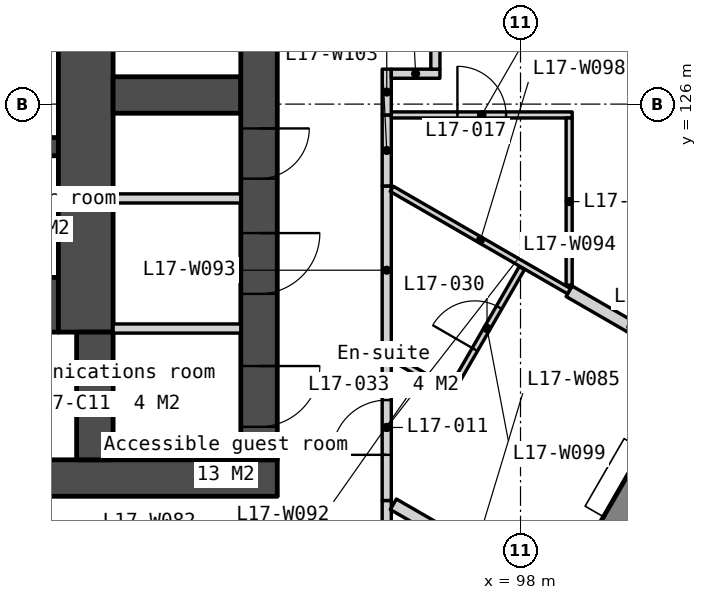
"""IFC4 building model, lengths in metres.
Left out: names, types, materials, properties, quantities, classifications, styles, units other than length and angle.
Written with IfcOpenShell. Run it as: python <this file> out.ifc"""

import sys

from ifc_helpers import new_model, si_unit, direction, frame, frame_2d, origin, place, context, subcontext, project, spatial, polyline, rectangle, outline, extrude, element, fill, save


model = new_model("IFC4")
c1 = context("Model", 3, precision=1e-05, world=origin(), true_north=direction((0.0, 1.0)))
c2 = subcontext(c1, "Body", "Model", "MODEL_VIEW")
j1 = project(units=[si_unit("LENGTHUNIT", "METRE"), si_unit("PLANEANGLEUNIT", "RADIAN")], contexts=[c1])
p1 = place(None, origin())
s1 = spatial("IfcSite", under=j1, at=p1, CompositionType="ELEMENT")
p2 = place(p1, origin())
s2 = spatial("IfcBuilding", under=s1, at=p2, CompositionType="ELEMENT")
p3 = place(p2, frame((0.0, 0.0, 73.5)))
s3 = spatial("IfcBuildingStorey", under=s2, at=p3, CompositionType="ELEMENT", Elevation=73.5)
p4 = place(p3, frame((66.0, 119.85, 0.0), z_axis=(0.0, 0.0, 1.0), x_axis=(1.0, 0.0, 0.0)))
e1 = element("IfcWall", 1, at=p4, inside=s3, PredefinedType="SOLIDWALL", context=c2, shape_type="SweptSolid", body=[
    extrude(rectangle(XDim=28.0, YDim=0.6, at=frame_2d((14.0, 0.0))), origin(), (0.0, 0.0, 1.0), 3.25),
])
p5 = place(p4, frame((6.825, 0.0, 0.0)))
e2 = element("IfcOpeningElement", 2, at=p5, cuts=e1, PredefinedType="OPENING", context=c2, shape_type="SweptSolid", body=[
    extrude(rectangle(XDim=1.8, YDim=2.1, at=frame_2d((0.9, 1.05))), frame((0.0, 0.31, 0.0), z_axis=(0.0, -1.0, 0.0), x_axis=(1.0, 0.0, 0.0)), (0.0, 0.0, 1.0), 0.62),
])
p6 = place(p4, frame((15.85, 0.0, 0.0)))
e3 = element("IfcOpeningElement", 3, at=p6, cuts=e1, PredefinedType="OPENING", context=c2, shape_type="SweptSolid", body=[
    extrude(rectangle(XDim=1.5, YDim=2.1, at=frame_2d((0.75, 1.05))), frame((0.0, 0.31, 0.0), z_axis=(0.0, -1.0, 0.0), x_axis=(1.0, 0.0, 0.0)), (0.0, 0.0, 1.0), 0.62),
])
p7 = place(p4, frame((19.375, 0.0, 0.0)))
e4 = element("IfcOpeningElement", 4, at=p7, cuts=e1, PredefinedType="OPENING", context=c2, shape_type="SweptSolid", body=[
    extrude(rectangle(XDim=1.8, YDim=2.1, at=frame_2d((0.9, 1.05))), frame((0.0, 0.31, 0.0), z_axis=(0.0, -1.0, 0.0), x_axis=(1.0, 0.0, 0.0)), (0.0, 0.0, 1.0), 0.62),
])
p8 = place(p4, frame((4.425, 0.0, 0.0)))
e5 = element("IfcOpeningElement", 5, at=p8, cuts=e1, PredefinedType="OPENING", context=c2, shape_type="SweptSolid", body=[
    extrude(rectangle(XDim=1.0, YDim=2.1, at=frame_2d((0.5, 1.05))), frame((0.0, 0.31, 0.0), z_axis=(0.0, -1.0, 0.0), x_axis=(1.0, 0.0, 0.0)), (0.0, 0.0, 1.0), 0.62),
])
p9 = place(p4, frame((9.783, 0.0, 0.0)))
e6 = element("IfcOpeningElement", 6, at=p9, cuts=e1, PredefinedType="OPENING", context=c2, shape_type="SweptSolid", body=[
    extrude(rectangle(XDim=1.0, YDim=2.1, at=frame_2d((0.5, 1.05))), frame((0.0, 0.31, 0.0), z_axis=(0.0, -1.0, 0.0), x_axis=(1.0, 0.0, 0.0)), (0.0, 0.0, 1.0), 0.62),
])
p10 = place(p4, frame((11.525, 0.0, 0.0)))
e7 = element("IfcOpeningElement", 7, at=p10, cuts=e1, PredefinedType="OPENING", context=c2, shape_type="SweptSolid", body=[
    extrude(rectangle(XDim=1.0, YDim=2.1, at=frame_2d((0.5, 1.05))), frame((0.0, 0.31, 0.0), z_axis=(0.0, -1.0, 0.0), x_axis=(1.0, 0.0, 0.0)), (0.0, 0.0, 1.0), 0.62),
])
p11 = place(p4, frame((13.658, 0.0, 0.0)))
e8 = element("IfcOpeningElement", 8, at=p11, cuts=e1, PredefinedType="OPENING", context=c2, shape_type="SweptSolid", body=[
    extrude(rectangle(XDim=1.0, YDim=2.1, at=frame_2d((0.5, 1.05))), frame((0.0, 0.31, 0.0), z_axis=(0.0, -1.0, 0.0), x_axis=(1.0, 0.0, 0.0)), (0.0, 0.0, 1.0), 0.62),
])
p12 = place(p4, frame((22.575, 0.0, 0.0)))
e9 = element("IfcOpeningElement", 9, at=p12, cuts=e1, PredefinedType="OPENING", context=c2, shape_type="SweptSolid", body=[
    extrude(rectangle(XDim=1.0, YDim=2.1, at=frame_2d((0.5, 1.05))), frame((0.0, 0.31, 0.0), z_axis=(0.0, -1.0, 0.0), x_axis=(1.0, 0.0, 0.0)), (0.0, 0.0, 1.0), 0.62),
])
p13 = place(p3, frame((87.85, 125.3, 0.0), z_axis=(0.0, 0.0, 1.0), x_axis=(1.0, 0.0, 0.0)))
e10 = element("IfcWall", 10, at=p13, inside=s3, PredefinedType="SOLIDWALL", context=c2, shape_type="SweptSolid", body=[
    extrude(rectangle(XDim=2.55, YDim=0.3, at=frame_2d((1.275, 0.0))), origin(), (0.0, 0.0, 1.0), 3.25),
])
p14 = place(p3, frame((87.85, 122.7, 0.0), z_axis=(0.0, 0.0, 1.0), x_axis=(1.0, 0.0, 0.0)))
e11 = element("IfcWall", 11, at=p14, inside=s3, PredefinedType="SOLIDWALL", context=c2, shape_type="SweptSolid", body=[
    extrude(rectangle(XDim=2.55, YDim=0.9, at=frame_2d((1.275, 0.0))), origin(), (0.0, 0.0, 1.0), 3.25),
])
p15 = place(p3, frame((90.85, 133.95, 0.0), z_axis=(0.0, 0.0, 1.0), x_axis=(0.0, -1.0, 0.0)))
e12 = element("IfcWall", 12, at=p15, inside=s3, PredefinedType="SOLIDWALL", context=c2, shape_type="SweptSolid", body=[
    extrude(rectangle(XDim=11.7, YDim=0.9, at=frame_2d((5.85, 0.0))), origin(), (0.0, 0.0, 1.0), 3.25),
])
p16 = place(p3, frame((91.0, 122.25, 0.0), z_axis=(0.0, 0.0, 1.0), x_axis=(0.0, -1.0, 0.0)))
e13 = element("IfcWall", 13, at=p16, inside=s3, PredefinedType="SOLIDWALL", context=c2, shape_type="SweptSolid", body=[
    extrude(rectangle(XDim=2.1, YDim=0.6, at=frame_2d((1.05, 0.0))), origin(), (0.0, 0.0, 1.0), 3.25),
])
p17 = place(p3, frame((91.3, 126.15, 0.0), z_axis=(0.0, 0.0, 1.0), x_axis=(1.0, 0.0, 0.0)))
e14 = element("IfcWall", 14, at=p17, inside=s3, PredefinedType="SOLIDWALL", context=c2, shape_type="SweptSolid", body=[
    extrude(rectangle(XDim=2.1, YDim=0.6, at=frame_2d((1.05, 0.0))), origin(), (0.0, 0.0, 1.0), 3.25),
])
for number, where, z_axis, x_axis in (
    (15, (91.3, 124.449, 0.0), (0.0, 0.0, 1.0), (1.0, 0.0, 0.0)),
    (16, (91.3, 122.309, 0.0), (0.0, 0.0, 1.0), (1.0, 0.0, 0.0)),
):
    element("IfcWall", number, at=place(p3, frame(where, z_axis=z_axis, x_axis=x_axis)), inside=s3, PredefinedType="PARTITIONING", context=c2, shape_type="SweptSolid", body=[
        extrude(rectangle(XDim=2.1, YDim=0.15, at=frame_2d((1.05, 0.0))), origin(), (0.0, 0.0, 1.0), 3.25),
    ])
p18 = place(p3, frame((93.7, 133.95, 0.0), z_axis=(0.0, 0.0, 1.0), x_axis=(0.0, -1.0, 0.0)))
e17 = element("IfcWall", 17, at=p18, inside=s3, PredefinedType="SOLIDWALL", context=c2, shape_type="SweptSolid", body=[
    extrude(rectangle(XDim=13.8, YDim=0.6, at=frame_2d((6.9, 0.0))), origin(), (0.0, 0.0, 1.0), 3.25),
])
p19 = place(p18, frame((0.6, 0.0, 0.0)))
e18 = element("IfcOpeningElement", 18, at=p19, cuts=e17, PredefinedType="OPENING", context=c2, shape_type="SweptSolid", body=[
    extrude(rectangle(XDim=1.1, YDim=2.1, at=frame_2d((0.55, 1.05))), frame((0.0, 0.31, 0.0), z_axis=(0.0, -1.0, 0.0), x_axis=(1.0, 0.0, 0.0)), (0.0, 0.0, 1.0), 0.62),
])
p20 = place(p18, frame((8.35, 0.0, 0.0)))
e19 = element("IfcOpeningElement", 19, at=p20, cuts=e17, PredefinedType="OPENING", context=c2, shape_type="SweptSolid", body=[
    extrude(rectangle(XDim=0.826, YDim=2.1, at=frame_2d((0.413, 1.05))), frame((0.0, 0.31, 0.0), z_axis=(0.0, -1.0, 0.0), x_axis=(1.0, 0.0, 0.0)), (0.0, 0.0, 1.0), 0.62),
])
p21 = place(p18, frame((10.071, 0.0, 0.0)))
e20 = element("IfcOpeningElement", 20, at=p21, cuts=e17, PredefinedType="OPENING", context=c2, shape_type="SweptSolid", body=[
    extrude(rectangle(XDim=1.0, YDim=2.1, at=frame_2d((0.5, 1.05))), frame((0.0, 0.31, 0.0), z_axis=(0.0, -1.0, 0.0), x_axis=(1.0, 0.0, 0.0)), (0.0, 0.0, 1.0), 0.62),
])
p22 = place(p18, frame((12.258, 0.0, 0.0)))
e21 = element("IfcOpeningElement", 21, at=p22, cuts=e17, PredefinedType="OPENING", context=c2, shape_type="SweptSolid", body=[
    extrude(rectangle(XDim=1.0, YDim=2.1, at=frame_2d((0.5, 1.05))), frame((0.0, 0.31, 0.0), z_axis=(0.0, -1.0, 0.0), x_axis=(1.0, 0.0, 0.0)), (0.0, 0.0, 1.0), 0.62),
])
p23 = place(p3, frame((83.105, 90.599, -0.15), z_axis=(0.0, 0.0, 1.0), x_axis=(0.499999201451, 0.866025864826, 0.0)))
e22 = element("IfcWall", 22, at=p23, inside=s3, PredefinedType="SOLIDWALL", context=c2, shape_type="SweptSolid", body=[
    extrude(outline(polyline([(44.8, 0.0), (44.8, 3.4), (0.0, 3.4), (0.0, 0.0), (44.8, 0.0)])), frame((0.0, 0.225, 0.0), z_axis=(0.0, -1.0, 0.0), x_axis=(1.0, 0.0, 0.0)), (0.0, 0.0, 1.0), 0.45),
])
p24 = place(p23, frame((3.03, 0.0, 1.05)))
e23 = element("IfcOpeningElement", 23, at=p24, cuts=e22, PredefinedType="OPENING", context=c2, shape_type="SweptSolid", body=[
    extrude(rectangle(XDim=1.2, YDim=1.5, at=frame_2d((0.6, 0.75))), frame((0.0, 0.235, 0.0), z_axis=(0.0, -1.0, 0.0), x_axis=(1.0, 0.0, 0.0)), (0.0, 0.0, 1.0), 0.47),
])
p25 = place(p23, frame((4.73, 0.0, 1.05)))
e24 = element("IfcOpeningElement", 24, at=p25, cuts=e22, PredefinedType="OPENING", context=c2, shape_type="SweptSolid", body=[
    extrude(rectangle(XDim=1.2, YDim=1.5, at=frame_2d((0.6, 0.75))), frame((0.0, 0.235, 0.0), z_axis=(0.0, -1.0, 0.0), x_axis=(1.0, 0.0, 0.0)), (0.0, 0.0, 1.0), 0.47),
])
p26 = place(p23, frame((11.99, 0.0, 1.05)))
e25 = element("IfcOpeningElement", 25, at=p26, cuts=e22, PredefinedType="OPENING", context=c2, shape_type="SweptSolid", body=[
    extrude(rectangle(XDim=1.2, YDim=1.5, at=frame_2d((0.6, 0.75))), frame((0.0, 0.235, 0.0), z_axis=(0.0, -1.0, 0.0), x_axis=(1.0, 0.0, 0.0)), (0.0, 0.0, 1.0), 0.47),
])
p27 = place(p23, frame((13.69, 0.0, 1.05)))
e26 = element("IfcOpeningElement", 26, at=p27, cuts=e22, PredefinedType="OPENING", context=c2, shape_type="SweptSolid", body=[
    extrude(rectangle(XDim=1.2, YDim=1.5, at=frame_2d((0.6, 0.75))), frame((0.0, 0.235, 0.0), z_axis=(0.0, -1.0, 0.0), x_axis=(1.0, 0.0, 0.0)), (0.0, 0.0, 1.0), 0.47),
])
p28 = place(p23, frame((20.95, 0.0, 1.05)))
e27 = element("IfcOpeningElement", 27, at=p28, cuts=e22, PredefinedType="OPENING", context=c2, shape_type="SweptSolid", body=[
    extrude(rectangle(XDim=1.2, YDim=1.5, at=frame_2d((0.6, 0.75))), frame((0.0, 0.235, 0.0), z_axis=(0.0, -1.0, 0.0), x_axis=(1.0, 0.0, 0.0)), (0.0, 0.0, 1.0), 0.47),
])
p29 = place(p23, frame((22.65, 0.0, 1.05)))
e28 = element("IfcOpeningElement", 28, at=p29, cuts=e22, PredefinedType="OPENING", context=c2, shape_type="SweptSolid", body=[
    extrude(rectangle(XDim=1.2, YDim=1.5, at=frame_2d((0.6, 0.75))), frame((0.0, 0.235, 0.0), z_axis=(0.0, -1.0, 0.0), x_axis=(1.0, 0.0, 0.0)), (0.0, 0.0, 1.0), 0.47),
])
p30 = place(p23, frame((29.91, 0.0, 1.05)))
e29 = element("IfcOpeningElement", 29, at=p30, cuts=e22, PredefinedType="OPENING", context=c2, shape_type="SweptSolid", body=[
    extrude(rectangle(XDim=1.2, YDim=1.5, at=frame_2d((0.6, 0.75))), frame((0.0, 0.235, 0.0), z_axis=(0.0, -1.0, 0.0), x_axis=(1.0, 0.0, 0.0)), (0.0, 0.0, 1.0), 0.47),
])
p31 = place(p23, frame((31.61, 0.0, 1.05)))
e30 = element("IfcOpeningElement", 30, at=p31, cuts=e22, PredefinedType="OPENING", context=c2, shape_type="SweptSolid", body=[
    extrude(rectangle(XDim=1.2, YDim=1.5, at=frame_2d((0.6, 0.75))), frame((0.0, 0.235, 0.0), z_axis=(0.0, -1.0, 0.0), x_axis=(1.0, 0.0, 0.0)), (0.0, 0.0, 1.0), 0.47),
])
p32 = place(p23, frame((38.87, 0.0, 1.05)))
e31 = element("IfcOpeningElement", 31, at=p32, cuts=e22, PredefinedType="OPENING", context=c2, shape_type="SweptSolid", body=[
    extrude(rectangle(XDim=1.2, YDim=1.5, at=frame_2d((0.6, 0.75))), frame((0.0, 0.235, 0.0), z_axis=(0.0, -1.0, 0.0), x_axis=(1.0, 0.0, 0.0)), (0.0, 0.0, 1.0), 0.47),
])
p33 = place(p23, frame((40.57, 0.0, 1.05)))
e32 = element("IfcOpeningElement", 32, at=p33, cuts=e22, PredefinedType="OPENING", context=c2, shape_type="SweptSolid", body=[
    extrude(rectangle(XDim=1.2, YDim=1.5, at=frame_2d((0.6, 0.75))), frame((0.0, 0.235, 0.0), z_axis=(0.0, -1.0, 0.0), x_axis=(1.0, 0.0, 0.0)), (0.0, 0.0, 1.0), 0.47),
])
p34 = place(p3, frame((95.8, 117.825, 0.0), z_axis=(0.0, 0.0, 1.0), x_axis=(0.0, 1.0, 0.0)))
e33 = element("IfcWall", 33, at=p34, inside=s3, PredefinedType="PARTITIONING", context=c2, shape_type="SweptSolid", body=[
    extrude(rectangle(XDim=1.656, YDim=0.15, at=frame_2d((0.828, 0.0))), origin(), (0.0, 0.0, 1.0), 3.25),
])
p35 = place(p3, frame((95.908, 119.418, 0.0), z_axis=(0.0, 0.0, 1.0), x_axis=(0.866051688794, -0.499954470265, 0.0)))
e34 = element("IfcWall", 34, at=p35, inside=s3, PredefinedType="PARTITIONING", context=c2, shape_type="SweptSolid", body=[
    extrude(rectangle(XDim=3.097, YDim=0.2, at=frame_2d((1.548, 0.0))), origin(), (0.0, 0.0, 1.0), 3.25),
])
p36 = place(p3, frame((95.882, 121.835, 0.0), z_axis=(0.0, 0.0, 1.0), x_axis=(0.86601174498, -0.500023656998, 0.0)))
e35 = element("IfcWall", 35, at=p36, inside=s3, PredefinedType="PARTITIONING", context=c2, shape_type="SweptSolid", body=[
    extrude(rectangle(XDim=1.169, YDim=0.1, at=frame_2d((0.585, 0.0))), origin(), (0.0, 0.0, 1.0), 3.25),
])
p37 = place(p3, frame((95.8, 121.883, 0.0), z_axis=(0.0, 0.0, 1.0), x_axis=(0.0, 1.0, 0.0)))
e36 = element("IfcWall", 36, at=p37, inside=s3, PredefinedType="PARTITIONING", context=c2, shape_type="SweptSolid", body=[
    extrude(rectangle(XDim=2.771, YDim=0.15, at=frame_2d((1.386, 0.0))), origin(), (0.0, 0.0, 1.0), 3.25),
])
p38 = place(p3, frame((95.8, 119.481, 0.0), z_axis=(0.0, 0.0, 1.0), x_axis=(0.0, 1.0, 0.0)))
e37 = element("IfcWall", 37, at=p38, inside=s3, PredefinedType="PARTITIONING", context=c2, shape_type="SweptSolid", body=[
    extrude(rectangle(XDim=2.402, YDim=0.15, at=frame_2d((1.201, 0.0))), origin(), (0.0, 0.0, 1.0), 3.25),
])
p39 = place(p38, frame((0.751, 0.0, 0.0)))
e38 = element("IfcOpeningElement", 38, at=p39, cuts=e37, PredefinedType="OPENING", context=c2, shape_type="SweptSolid", body=[
    extrude(rectangle(XDim=0.9, YDim=2.1, at=frame_2d((0.45, 1.05))), frame((0.0, 0.085, 0.0), z_axis=(0.0, -1.0, 0.0), x_axis=(1.0, 0.0, 0.0)), (0.0, 0.0, 1.0), 0.17),
])
p40 = place(p3, frame((95.882, 124.606, 0.0), z_axis=(0.0, 0.0, 1.0), x_axis=(0.866022675988, -0.500004724652, 0.0)))
e39 = element("IfcWall", 39, at=p40, inside=s3, PredefinedType="PARTITIONING", context=c2, shape_type="SweptSolid", body=[
    extrude(rectangle(XDim=3.369, YDim=0.1, at=frame_2d((1.685, 0.0))), origin(), (0.0, 0.0, 1.0), 3.25),
])
p41 = place(p3, frame((96.877, 121.319, 0.0), z_axis=(0.0, 0.0, 1.0), x_axis=(0.499968531483, 0.866043571379, 0.0)))
e40 = element("IfcWall", 40, at=p41, inside=s3, PredefinedType="PARTITIONING", context=c2, shape_type="SweptSolid", body=[
    extrude(rectangle(XDim=2.29, YDim=0.1, at=frame_2d((1.145, 0.0))), origin(), (0.0, 0.0, 1.0), 3.25),
])
p42 = place(p41, frame((0.745, 0.0, 0.0)))
e41 = element("IfcOpeningElement", 41, at=p42, cuts=e40, PredefinedType="OPENING", context=c2, shape_type="SweptSolid", body=[
    extrude(rectangle(XDim=0.8, YDim=2.1, at=frame_2d((0.4, 1.05))), frame((0.0, 0.06, 0.0), z_axis=(0.0, -1.0, 0.0), x_axis=(1.0, 0.0, 0.0)), (0.0, 0.0, 1.0), 0.12),
])
p43 = place(p3, frame((98.8, 122.922, 0.0), z_axis=(0.0, 0.0, 1.0), x_axis=(0.866036444415, -0.49998087658, 0.0)))
e42 = element("IfcWall", 42, at=p43, inside=s3, PredefinedType="PARTITIONING", context=c2, shape_type="SweptSolid", body=[
    extrude(rectangle(XDim=2.344, YDim=0.2, at=frame_2d((1.172, 0.0))), origin(), (0.0, 0.0, 1.0), 3.25),
])
p44 = place(p3, frame((95.8, 124.654, 0.0), z_axis=(0.0, 0.0, 1.0), x_axis=(0.0, 1.0, 0.0)))
e43 = element("IfcWall", 43, at=p44, inside=s3, PredefinedType="PARTITIONING", context=c2, shape_type="SweptSolid", body=[
    extrude(rectangle(XDim=1.168, YDim=0.15, at=frame_2d((0.584, 0.0))), origin(), (0.0, 0.0, 1.0), 3.25),
])
p45 = place(p3, frame((95.875, 125.822, 0.0), z_axis=(0.0, 0.0, 1.0), x_axis=(1.0, 0.0, 0.0)))
e44 = element("IfcWall", 44, at=p45, inside=s3, PredefinedType="PARTITIONING", context=c2, shape_type="SweptSolid", body=[
    extrude(rectangle(XDim=2.975, YDim=0.1, at=frame_2d((1.488, 0.0))), origin(), (0.0, 0.0, 1.0), 3.25),
])
p46 = place(p45, frame((1.087, 0.0, 0.0)))
e45 = element("IfcOpeningElement", 45, at=p46, cuts=e44, PredefinedType="OPENING", context=c2, shape_type="SweptSolid", body=[
    extrude(rectangle(XDim=0.8, YDim=2.1, at=frame_2d((0.4, 1.05))), frame((0.0, 0.06, 0.0), z_axis=(0.0, -1.0, 0.0), x_axis=(1.0, 0.0, 0.0)), (0.0, 0.0, 1.0), 0.12),
])
p47 = place(p3, frame((98.8, 123.022, 0.0), z_axis=(0.0, 0.0, 1.0), x_axis=(0.0, 1.0, 0.0)))
e46 = element("IfcWall", 46, at=p47, inside=s3, PredefinedType="PARTITIONING", context=c2, shape_type="SweptSolid", body=[
    extrude(rectangle(XDim=2.75, YDim=0.1, at=frame_2d((1.375, 0.0))), origin(), (0.0, 0.0, 1.0), 3.25),
])
p48 = place(p3, frame((95.8, 125.822, 0.0), z_axis=(0.0, 0.0, 1.0), x_axis=(0.0, 1.0, 0.0)))
e47 = element("IfcWall", 47, at=p48, inside=s3, PredefinedType="PARTITIONING", context=c2, shape_type="SweptSolid", body=[
    extrude(rectangle(XDim=0.753, YDim=0.15, at=frame_2d((0.376, 0.0))), origin(), (0.0, 0.0, 1.0), 3.25),
])
p49 = place(p3, frame((95.875, 126.5, 0.0), z_axis=(0.0, 0.0, 1.0), x_axis=(1.0, 0.0, 0.0)))
e48 = element("IfcWall", 48, at=p49, inside=s3, PredefinedType="PARTITIONING", context=c2, shape_type="SweptSolid", body=[
    extrude(rectangle(XDim=0.8, YDim=0.15, at=frame_2d((0.4, 0.0))), origin(), (0.0, 0.0, 1.0), 3.25),
])
p50 = place(p3, frame((96.6, 133.925, 0.0), z_axis=(0.0, 0.0, 1.0), x_axis=(6.643194e-05, -0.999999997793, 0.0)))
e49 = element("IfcWall", 49, at=p50, inside=s3, PredefinedType="PARTITIONING", context=c2, shape_type="SweptSolid", body=[
    extrude(rectangle(XDim=7.35, YDim=0.15, at=frame_2d((3.675, 0.0))), origin(), (0.0, 0.0, 1.0), 3.25),
])
p51 = place(p50, frame((3.175, 0.0, 0.0)))
e50 = element("IfcOpeningElement", 50, at=p51, cuts=e49, PredefinedType="OPENING", context=c2, shape_type="SweptSolid", body=[
    extrude(rectangle(XDim=1.0, YDim=2.1, at=frame_2d((0.5, 1.05))), frame((0.0, 0.085, 0.0), z_axis=(0.0, -1.0, 0.0), x_axis=(1.0, 0.0, 0.0)), (0.0, 0.0, 1.0), 0.17),
])
p52 = place(p20, origin())
e51 = element("IfcDoor", 51, at=p52, inside=s3, OperationType="SINGLE_SWING_LEFT", PredefinedType="DOOR", context=c2, shape_type="SweptSolid", body=[
    extrude(rectangle(XDim=0.826, YDim=2.1, at=frame_2d((0.413, 1.05))), frame((0.0, 0.025, 0.0), z_axis=(0.0, -1.0, 0.0), x_axis=(1.0, 0.0, 0.0)), (0.0, 0.0, 1.0), 0.05),
])
fill(e19, e51)
p53 = place(p21, origin())
e52 = element("IfcDoor", 52, at=p53, inside=s3, OperationType="SINGLE_SWING_LEFT", PredefinedType="DOOR", context=c2, shape_type="SweptSolid", body=[
    extrude(rectangle(XDim=1.0, YDim=2.1, at=frame_2d((0.5, 1.05))), frame((0.0, 0.025, 0.0), z_axis=(0.0, -1.0, 0.0), x_axis=(1.0, 0.0, 0.0)), (0.0, 0.0, 1.0), 0.05),
])
fill(e20, e52)
p54 = place(p22, origin())
e53 = element("IfcDoor", 53, at=p54, inside=s3, OperationType="SINGLE_SWING_LEFT", PredefinedType="DOOR", context=c2, shape_type="SweptSolid", body=[
    extrude(rectangle(XDim=1.0, YDim=2.1, at=frame_2d((0.5, 1.05))), frame((0.0, 0.025, 0.0), z_axis=(0.0, -1.0, 0.0), x_axis=(1.0, 0.0, 0.0)), (0.0, 0.0, 1.0), 0.05),
])
fill(e21, e53)
p55 = place(p39, origin())
e54 = element("IfcDoor", 54, at=p55, inside=s3, OperationType="SINGLE_SWING_LEFT", PredefinedType="DOOR", context=c2, shape_type="SweptSolid", body=[
    extrude(rectangle(XDim=0.9, YDim=2.1, at=frame_2d((0.45, 1.05))), frame((0.0, 0.025, 0.0), z_axis=(0.0, -1.0, 0.0), x_axis=(1.0, 0.0, 0.0)), (0.0, 0.0, 1.0), 0.05),
])
fill(e38, e54)
p56 = place(p46, origin())
e55 = element("IfcDoor", 55, at=p56, inside=s3, OperationType="SINGLE_SWING_LEFT", PredefinedType="DOOR", context=c2, shape_type="SweptSolid", body=[
    extrude(rectangle(XDim=0.8, YDim=2.1, at=frame_2d((0.4, 1.05))), frame((0.0, 0.025, 0.0), z_axis=(0.0, -1.0, 0.0), x_axis=(1.0, 0.0, 0.0)), (0.0, 0.0, 1.0), 0.05),
])
fill(e45, e55)
p57 = place(p42, origin())
e56 = element("IfcDoor", 56, at=p57, inside=s3, OperationType="SINGLE_SWING_LEFT", PredefinedType="DOOR", context=c2, shape_type="SweptSolid", body=[
    extrude(rectangle(XDim=0.8, YDim=2.1, at=frame_2d((0.4, 1.05))), frame((0.0, 0.025, 0.0), z_axis=(0.0, -1.0, 0.0), x_axis=(1.0, 0.0, 0.0)), (0.0, 0.0, 1.0), 0.05),
])
fill(e41, e56)
save(model, sys.argv[1])
